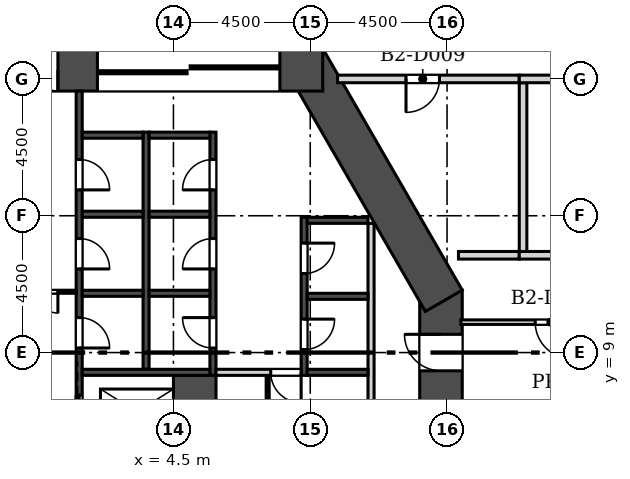
"""IFC4 building model, lengths in metres.
Left out: names, types, materials, properties, quantities, classifications, styles, units other than length and angle.
Written with IfcOpenShell. Run it as: python <this file> out.ifc"""

import sys

from ifc_helpers import new_model, si_unit, direction, frame, frame_2d, origin, place, context, subcontext, project, spatial, rectangle, extrude, element, fill, save


model = new_model("IFC4")
c1 = context("Model", 3, precision=1e-05, world=origin(), true_north=direction((0.0, 1.0)))
c2 = subcontext(c1, "Body", "Model", "MODEL_VIEW")
j1 = project(units=[si_unit("LENGTHUNIT", "METRE"), si_unit("PLANEANGLEUNIT", "RADIAN")], contexts=[c1])
p1 = place(None, origin())
s1 = spatial("IfcSite", under=j1, at=p1, CompositionType="ELEMENT")
p2 = place(p1, origin())
s2 = spatial("IfcBuilding", under=s1, at=p2, CompositionType="ELEMENT")
p3 = place(p2, frame((0.0, 0.0, -14.0)))
s3 = spatial("IfcBuildingStorey", under=s2, at=p3, CompositionType="ELEMENT", Elevation=-14.0)
p4 = place(p3, frame((42.971, 8.51, -0.4), z_axis=(0.0, 0.0, 1.0), x_axis=(-0.499999312333, 0.866025800809, 0.0)))
e1 = element("IfcWall", 1, at=p4, inside=s3, PredefinedType="SOLIDWALL", context=c2, shape_type="SweptSolid", body=[
    extrude(rectangle(XDim=76.231, YDim=0.6, at=frame_2d((38.115, 0.0))), origin(), (0.0, 0.0, 1.0), 6.4),
])
p5 = place(p3, frame((13.3, 0.85, 0.0), z_axis=(0.0, 0.0, 1.0), x_axis=(0.0, 1.0, 0.0)))
e2 = element("IfcWall", 2, at=p5, inside=s3, PredefinedType="SHEAR", context=c2, shape_type="SweptSolid", body=[
    extrude(rectangle(XDim=10.202, YDim=1.4, at=frame_2d((5.101, 0.0))), origin(), (0.0, 0.0, 1.0), 6.0),
])
p6 = place(p5, frame((3.55, 0.0, 0.0)))
e3 = element("IfcOpeningElement", 3, at=p6, cuts=e2, PredefinedType="OPENING", context=c2, shape_type="SweptSolid", body=[
    extrude(rectangle(XDim=1.2, YDim=2.1, at=frame_2d((0.6, 1.05))), frame((0.0, 0.71, 0.0), z_axis=(0.0, -1.0, 0.0), x_axis=(1.0, 0.0, 0.0)), (0.0, 0.0, 1.0), 1.42),
])
p7 = place(p5, frame((7.55, 0.0, 0.0)))
e4 = element("IfcOpeningElement", 4, at=p7, cuts=e2, PredefinedType="OPENING", context=c2, shape_type="SweptSolid", body=[
    extrude(rectangle(XDim=1.2, YDim=2.1, at=frame_2d((0.6, 1.05))), frame((0.0, 0.71, 0.0), z_axis=(0.0, -1.0, 0.0), x_axis=(1.0, 0.0, 0.0)), (0.0, 0.0, 1.0), 1.42),
])
p8 = place(p3, frame((13.394, 10.703, 0.0), z_axis=(0.0, 0.0, 1.0), x_axis=(-0.50000187635, 0.866024320471, 0.0)))
e5 = element("IfcWall", 5, at=p8, inside=s3, PredefinedType="SHEAR", context=c2, shape_type="SweptSolid", body=[
    extrude(rectangle(XDim=9.177, YDim=1.4, at=frame_2d((4.588, 0.0))), origin(), (0.0, 0.0, 1.0), 6.0),
])
p9 = place(p3, frame((9.412, 18.3, 0.0), z_axis=(0.0, 0.0, 1.0), x_axis=(-1.0, 0.0, 0.0)))
e6 = element("IfcWall", 6, at=p9, inside=s3, PredefinedType="SHEAR", context=c2, shape_type="SweptSolid", body=[
    extrude(rectangle(XDim=18.823, YDim=1.4, at=frame_2d((9.412, 0.0))), origin(), (0.0, 0.0, 1.0), 6.0),
])
p10 = place(p9, frame((8.711, 0.0, 0.0)))
e7 = element("IfcOpeningElement", 7, at=p10, cuts=e6, PredefinedType="OPENING", context=c2, shape_type="SweptSolid", body=[
    extrude(rectangle(XDim=1.4, YDim=2.1, at=frame_2d((0.7, 1.05))), frame((0.0, 0.71, 0.0), z_axis=(0.0, -1.0, 0.0), x_axis=(1.0, 0.0, 0.0)), (0.0, 0.0, 1.0), 1.42),
])
p11 = place(p9, frame((11.412, 0.0, 0.0)))
e8 = element("IfcOpeningElement", 8, at=p11, cuts=e6, PredefinedType="OPENING", context=c2, shape_type="SweptSolid", body=[
    extrude(rectangle(XDim=6.0, YDim=2.4, at=frame_2d((3.0, 1.2))), frame((0.0, 0.71, 0.0), z_axis=(0.0, -1.0, 0.0), x_axis=(1.0, 0.0, 0.0)), (0.0, 0.0, 1.0), 1.42),
])
p12 = place(p9, frame((1.412, 0.0, 0.0)))
e9 = element("IfcOpeningElement", 9, at=p12, cuts=e6, PredefinedType="OPENING", context=c2, shape_type="SweptSolid", body=[
    extrude(rectangle(XDim=6.0, YDim=2.4, at=frame_2d((3.0, 1.2))), frame((0.0, 0.71, 0.0), z_axis=(0.0, -1.0, 0.0), x_axis=(1.0, 0.0, 0.0)), (0.0, 0.0, 1.0), 1.42),
])
p13 = place(p3, frame((11.0, 5.85, 0.0), z_axis=(0.0, 0.0, 1.0), x_axis=(0.0, 1.0, 0.0)))
e10 = element("IfcWall", 10, at=p13, inside=s3, PredefinedType="SOLIDWALL", context=c2, shape_type="SweptSolid", body=[
    extrude(rectangle(XDim=7.4, YDim=0.2, at=frame_2d((3.7, 0.0))), origin(), (0.0, 0.0, 1.0), 5.65),
])
p14 = place(p3, frame((8.8, 8.25, 0.0), z_axis=(0.0, 0.0, 1.0), x_axis=(0.0, 1.0, 0.0)))
e11 = element("IfcWall", 11, at=p14, inside=s3, PredefinedType="SOLIDWALL", context=c2, shape_type="SweptSolid", body=[
    extrude(rectangle(XDim=5.2, YDim=0.2, at=frame_2d((2.6, 0.0))), origin(), (0.0, 0.0, 1.0), 5.65),
])
p15 = place(p14, frame((0.85, 0.0, 0.0)))
e12 = element("IfcOpeningElement", 12, at=p15, cuts=e11, PredefinedType="OPENING", context=c2, shape_type="SweptSolid", body=[
    extrude(rectangle(XDim=1.0, YDim=2.1, at=frame_2d((0.5, 1.05))), frame((0.0, 0.11, 0.0), z_axis=(0.0, -1.0, 0.0), x_axis=(1.0, 0.0, 0.0)), (0.0, 0.0, 1.0), 0.22),
])
p16 = place(p14, frame((3.35, 0.0, 0.0)))
e13 = element("IfcOpeningElement", 13, at=p16, cuts=e11, PredefinedType="OPENING", context=c2, shape_type="SweptSolid", body=[
    extrude(rectangle(XDim=1.0, YDim=2.1, at=frame_2d((0.5, 1.05))), frame((0.0, 0.11, 0.0), z_axis=(0.0, -1.0, 0.0), x_axis=(1.0, 0.0, 0.0)), (0.0, 0.0, 1.0), 0.22),
])
p17 = place(p3, frame((5.8, 8.25, 0.0), z_axis=(0.0, 0.0, 1.0), x_axis=(0.0, 1.0, 0.0)))
e14 = element("IfcWall", 14, at=p17, inside=s3, PredefinedType="SOLIDWALL", context=c2, shape_type="SweptSolid", body=[
    extrude(rectangle(XDim=8.0, YDim=0.2, at=frame_2d((4.0, 0.0))), origin(), (0.0, 0.0, 1.0), 5.65),
])
p18 = place(p17, frame((0.9, 0.0, 0.0)))
e15 = element("IfcOpeningElement", 15, at=p18, cuts=e14, PredefinedType="OPENING", context=c2, shape_type="SweptSolid", body=[
    extrude(rectangle(XDim=1.0, YDim=2.1, at=frame_2d((0.5, 1.05))), frame((0.0, 0.11, 0.0), z_axis=(0.0, -1.0, 0.0), x_axis=(1.0, 0.0, 0.0)), (0.0, 0.0, 1.0), 0.22),
])
p19 = place(p17, frame((3.5, 0.0, 0.0)))
e16 = element("IfcOpeningElement", 16, at=p19, cuts=e14, PredefinedType="OPENING", context=c2, shape_type="SweptSolid", body=[
    extrude(rectangle(XDim=1.0, YDim=2.1, at=frame_2d((0.5, 1.05))), frame((0.0, 0.11, 0.0), z_axis=(0.0, -1.0, 0.0), x_axis=(1.0, 0.0, 0.0)), (0.0, 0.0, 1.0), 0.22),
])
p20 = place(p17, frame((6.1, 0.0, 0.0)))
e17 = element("IfcOpeningElement", 17, at=p20, cuts=e14, PredefinedType="OPENING", context=c2, shape_type="SweptSolid", body=[
    extrude(rectangle(XDim=1.0, YDim=2.1, at=frame_2d((0.5, 1.05))), frame((0.0, 0.11, 0.0), z_axis=(0.0, -1.0, 0.0), x_axis=(1.0, 0.0, 0.0)), (0.0, 0.0, 1.0), 0.22),
])
p21 = place(p3, frame((3.6, 8.45, 0.0), z_axis=(0.0, 0.0, 1.0), x_axis=(0.0, 1.0, 0.0)))
e18 = element("IfcWall", 18, at=p21, inside=s3, PredefinedType="SOLIDWALL", context=c2, shape_type="SweptSolid", body=[
    extrude(rectangle(XDim=7.8, YDim=0.2, at=frame_2d((3.9, 0.0))), origin(), (0.0, 0.0, 1.0), 5.65),
])
p22 = place(p3, frame((1.4, 5.85, 0.0), z_axis=(0.0, 0.0, 1.0), x_axis=(0.0, 1.0, 0.0)))
e19 = element("IfcWall", 19, at=p22, inside=s3, PredefinedType="SOLIDWALL", context=c2, shape_type="SweptSolid", body=[
    extrude(rectangle(XDim=11.75, YDim=0.2, at=frame_2d((5.875, 0.0))), origin(), (0.0, 0.0, 1.0), 5.65),
])
p23 = place(p22, frame((0.65, 0.0, 0.0)))
e20 = element("IfcOpeningElement", 20, at=p23, cuts=e19, PredefinedType="OPENING", context=c2, shape_type="SweptSolid", body=[
    extrude(rectangle(XDim=1.1, YDim=2.1, at=frame_2d((0.55, 1.05))), frame((0.0, 0.11, 0.0), z_axis=(0.0, -1.0, 0.0), x_axis=(1.0, 0.0, 0.0)), (0.0, 0.0, 1.0), 0.22),
])
p24 = place(p22, frame((3.3, 0.0, 0.0)))
e21 = element("IfcOpeningElement", 21, at=p24, cuts=e19, PredefinedType="OPENING", context=c2, shape_type="SweptSolid", body=[
    extrude(rectangle(XDim=1.0, YDim=2.1, at=frame_2d((0.5, 1.05))), frame((0.0, 0.11, 0.0), z_axis=(0.0, -1.0, 0.0), x_axis=(1.0, 0.0, 0.0)), (0.0, 0.0, 1.0), 0.22),
])
p25 = place(p22, frame((5.9, 0.0, 0.0)))
e22 = element("IfcOpeningElement", 22, at=p25, cuts=e19, PredefinedType="OPENING", context=c2, shape_type="SweptSolid", body=[
    extrude(rectangle(XDim=1.0, YDim=2.1, at=frame_2d((0.5, 1.05))), frame((0.0, 0.11, 0.0), z_axis=(0.0, -1.0, 0.0), x_axis=(1.0, 0.0, 0.0)), (0.0, 0.0, 1.0), 0.22),
])
p26 = place(p22, frame((8.5, 0.0, 0.0)))
e23 = element("IfcOpeningElement", 23, at=p26, cuts=e19, PredefinedType="OPENING", context=c2, shape_type="SweptSolid", body=[
    extrude(rectangle(XDim=1.0, YDim=2.1, at=frame_2d((0.5, 1.05))), frame((0.0, 0.11, 0.0), z_axis=(0.0, -1.0, 0.0), x_axis=(1.0, 0.0, 0.0)), (0.0, 0.0, 1.0), 0.22),
])
p27 = place(p3, frame((5.2, 5.85, 0.0), z_axis=(0.0, 0.0, 1.0), x_axis=(0.0, 1.0, 0.0)))
e24 = element("IfcWall", 24, at=p27, inside=s3, PredefinedType="SOLIDWALL", context=c2, shape_type="SweptSolid", body=[
    extrude(rectangle(XDim=2.4, YDim=1.4, at=frame_2d((1.2, 0.0))), origin(), (0.0, 0.0, 1.0), 5.65),
])
p28 = place(p3, frame((8.9, 8.35, 0.0), z_axis=(0.0, 0.0, 1.0), x_axis=(1.0, 0.0, 0.0)))
e25 = element("IfcWall", 25, at=p28, inside=s3, PredefinedType="SOLIDWALL", context=c2, shape_type="SweptSolid", body=[
    extrude(rectangle(XDim=2.0, YDim=0.2, at=frame_2d((1.0, 0.0))), origin(), (0.0, 0.0, 1.0), 5.65),
])
p29 = place(p3, frame((1.5, 8.35, 0.0), z_axis=(0.0, 0.0, 1.0), x_axis=(1.0, 0.0, 0.0)))
e26 = element("IfcWall", 26, at=p29, inside=s3, PredefinedType="SOLIDWALL", context=c2, shape_type="SweptSolid", body=[
    extrude(rectangle(XDim=4.2, YDim=0.2, at=frame_2d((2.1, 0.0))), origin(), (0.0, 0.0, 1.0), 5.65),
])
for number, where, z_axis, x_axis in (
    (27, (8.9, 10.85, 0.0), (0.0, 0.0, 1.0), (1.0, 0.0, 0.0)),
    (28, (8.9, 13.35, 0.0), (0.0, 0.0, 1.0), (1.0, 0.0, 0.0)),
    (29, (3.7, 10.95, 0.0), (0.0, 0.0, 1.0), (1.0, 0.0, 0.0)),
    (30, (3.7, 13.55, 0.0), (0.0, 0.0, 1.0), (1.0, 0.0, 0.0)),
    (31, (3.7, 16.15, 0.0), (0.0, 0.0, 1.0), (1.0, 0.0, 0.0)),
    (32, (1.5, 10.95, 0.0), (0.0, 0.0, 1.0), (1.0, 0.0, 0.0)),
    (33, (1.5, 13.55, 0.0), (0.0, 0.0, 1.0), (1.0, 0.0, 0.0)),
    (34, (1.5, 16.15, 0.0), (0.0, 0.0, 1.0), (1.0, 0.0, 0.0)),
):
    element("IfcWall", number, at=place(p3, frame(where, z_axis=z_axis, x_axis=x_axis)), inside=s3, PredefinedType="SOLIDWALL", context=c2, shape_type="SweptSolid", body=[
        extrude(rectangle(XDim=2.0, YDim=0.2, at=frame_2d((1.0, 0.0))), origin(), (0.0, 0.0, 1.0), 5.65),
    ])
p30 = place(p3, frame((7.6, 5.85, 0.0), z_axis=(0.0, 0.0, 1.0), x_axis=(0.0, 1.0, 0.0)))
e35 = element("IfcWall", 35, at=p30, inside=s3, PredefinedType="PARTITIONING", context=c2, shape_type="SweptSolid", body=[
    extrude(rectangle(XDim=2.4, YDim=0.1, at=frame_2d((1.2, 0.0))), origin(), (0.0, 0.0, 1.0), 5.65),
])
p31 = place(p30, frame((0.7, 0.0, 0.0)))
e36 = element("IfcOpeningElement", 36, at=p31, cuts=e35, PredefinedType="OPENING", context=c2, shape_type="SweptSolid", body=[
    extrude(rectangle(XDim=0.9, YDim=2.1, at=frame_2d((0.45, 1.05))), frame((0.0, 0.06, 0.0), z_axis=(0.0, -1.0, 0.0), x_axis=(1.0, 0.0, 0.0)), (0.0, 0.0, 1.0), 0.12),
])
p32 = place(p3, frame((5.9, 8.35, 0.0), z_axis=(0.0, 0.0, 1.0), x_axis=(1.0, 0.0, 0.0)))
e37 = element("IfcWall", 37, at=p32, inside=s3, PredefinedType="SOLIDWALL", context=c2, shape_type="SweptSolid", body=[
    extrude(rectangle(XDim=2.8, YDim=0.2, at=frame_2d((1.4, 0.0))), origin(), (0.0, 0.0, 1.0), 5.65),
])
p33 = place(p32, frame((1.8, 0.0, 0.0)))
e38 = element("IfcOpeningElement", 38, at=p33, cuts=e37, PredefinedType="OPENING", context=c2, shape_type="SweptSolid", body=[
    extrude(rectangle(XDim=1.0, YDim=2.1, at=frame_2d((0.5, 1.05))), frame((0.0, 0.11, 0.0), z_axis=(0.0, -1.0, 0.0), x_axis=(1.0, 0.0, 0.0)), (0.0, 0.0, 1.0), 0.22),
])
p34 = place(p3, frame((-1.3, 11.0, 0.0), z_axis=(0.0, 0.0, 1.0), x_axis=(1.0, 0.0, 0.0)))
e39 = element("IfcWall", 39, at=p34, inside=s3, PredefinedType="PARTITIONING", context=c2, shape_type="SweptSolid", body=[
    extrude(rectangle(XDim=2.6, YDim=0.1, at=frame_2d((1.3, 0.0))), origin(), (0.0, 0.0, 1.0), 5.65),
])
p35 = place(p34, frame((0.6, 0.0, 0.0)))
e40 = element("IfcOpeningElement", 40, at=p35, cuts=e39, PredefinedType="OPENING", context=c2, shape_type="SweptSolid", body=[
    extrude(rectangle(XDim=1.4, YDim=2.1, at=frame_2d((0.7, 1.05))), frame((0.0, 0.06, 0.0), z_axis=(0.0, -1.0, 0.0), x_axis=(1.0, 0.0, 0.0)), (0.0, 0.0, 1.0), 0.12),
])
p36 = place(p3, frame((13.955, 10.0, 0.0), z_axis=(0.0, 0.0, 1.0), x_axis=(1.0, 0.0, 0.0)))
e41 = element("IfcWall", 41, at=p36, inside=s3, PredefinedType="PARTITIONING", context=c2, shape_type="SweptSolid", body=[
    extrude(rectangle(XDim=5.92, YDim=0.15, at=frame_2d((2.96, 0.0))), origin(), (0.0, 0.0, 1.0), 5.65),
])
p37 = place(p36, frame((2.445, 0.0, 0.0)))
e42 = element("IfcOpeningElement", 42, at=p37, cuts=e41, PredefinedType="OPENING", context=c2, shape_type="SweptSolid", body=[
    extrude(rectangle(XDim=1.2, YDim=2.1, at=frame_2d((0.6, 1.05))), frame((0.0, 0.085, 0.0), z_axis=(0.0, -1.0, 0.0), x_axis=(1.0, 0.0, 0.0)), (0.0, 0.0, 1.0), 0.17),
])
p38 = place(p3, frame((13.875, 12.2, 0.0), z_axis=(0.0, 0.0, 1.0), x_axis=(1.0, 0.0, 0.0)))
e43 = element("IfcWall", 43, at=p38, inside=s3, PredefinedType="SOLIDWALL", context=c2, shape_type="SweptSolid", body=[
    extrude(rectangle(XDim=2.0, YDim=0.25, at=frame_2d((1.0, 0.0))), origin(), (0.0, 0.0, 1.0), 5.65),
])
p39 = place(p3, frame((15.875, 12.2, 0.0), z_axis=(0.0, 0.0, 1.0), x_axis=(1.0, 0.0, 0.0)))
e44 = element("IfcWall", 44, at=p39, inside=s3, PredefinedType="SOLIDWALL", context=c2, shape_type="SweptSolid", body=[
    extrude(rectangle(XDim=6.0, YDim=0.25, at=frame_2d((3.0, 0.0))), origin(), (0.0, 0.0, 1.0), 5.65),
])
p40 = place(p3, frame((16.0, 17.875, 0.0), z_axis=(0.0, 0.0, 1.0), x_axis=(0.0, -1.0, 0.0)))
e45 = element("IfcWall", 45, at=p40, inside=s3, PredefinedType="SOLIDWALL", context=c2, shape_type="SweptSolid", body=[
    extrude(rectangle(XDim=5.55, YDim=0.25, at=frame_2d((2.775, 0.0))), origin(), (0.0, 0.0, 1.0), 5.65),
])
p41 = place(p3, frame((15.875, 18.0, 0.0), z_axis=(0.0, 0.0, 1.0), x_axis=(-1.0, 0.0, 0.0)))
e46 = element("IfcWall", 46, at=p41, inside=s3, PredefinedType="SOLIDWALL", context=c2, shape_type="SweptSolid", body=[
    extrude(rectangle(XDim=5.977, YDim=0.25, at=frame_2d((2.988, 0.0))), origin(), (0.0, 0.0, 1.0), 5.65),
])
p42 = place(p41, frame((2.625, 0.0, 0.0)))
e47 = element("IfcOpeningElement", 47, at=p42, cuts=e46, PredefinedType="OPENING", context=c2, shape_type="SweptSolid", body=[
    extrude(rectangle(XDim=1.1, YDim=2.1, at=frame_2d((0.55, 1.05))), frame((0.0, 0.135, 0.0), z_axis=(0.0, -1.0, 0.0), x_axis=(1.0, 0.0, 0.0)), (0.0, 0.0, 1.0), 0.27),
])
p43 = place(p3, frame((21.875, 18.0, 0.0), z_axis=(0.0, 0.0, 1.0), x_axis=(-1.0, 0.0, 0.0)))
e48 = element("IfcWall", 48, at=p43, inside=s3, PredefinedType="SOLIDWALL", context=c2, shape_type="SweptSolid", body=[
    extrude(rectangle(XDim=6.0, YDim=0.25, at=frame_2d((3.0, 0.0))), origin(), (0.0, 0.0, 1.0), 5.65),
])
p44 = place(p43, frame((2.325, 0.0, 0.0)))
e49 = element("IfcOpeningElement", 49, at=p44, cuts=e48, PredefinedType="OPENING", context=c2, shape_type="SweptSolid", body=[
    extrude(rectangle(XDim=1.1, YDim=2.1, at=frame_2d((0.55, 1.05))), frame((0.0, 0.135, 0.0), z_axis=(0.0, -1.0, 0.0), x_axis=(1.0, 0.0, 0.0)), (0.0, 0.0, 1.0), 0.27),
])
p45 = place(p23, origin())
e50 = element("IfcDoor", 50, at=p45, inside=s3, OperationType="SLIDING_TO_RIGHT", PredefinedType="DOOR", context=c2, shape_type="SweptSolid", body=[
    extrude(rectangle(XDim=1.1, YDim=2.1, at=frame_2d((0.55, 1.05))), frame((0.0, 0.025, 0.0), z_axis=(0.0, -1.0, 0.0), x_axis=(1.0, 0.0, 0.0)), (0.0, 0.0, 1.0), 0.05),
])
fill(e20, e50)
p46 = place(p15, frame((1.0, 0.0, 0.0), z_axis=(0.0, 0.0, 1.0), x_axis=(-1.0, 0.0, 0.0)))
e51 = element("IfcDoor", 51, at=p46, inside=s3, OperationType="SINGLE_SWING_LEFT", PredefinedType="DOOR", context=c2, shape_type="SweptSolid", body=[
    extrude(rectangle(XDim=1.0, YDim=2.1, at=frame_2d((0.5, 1.05))), frame((0.0, 0.025, 0.0), z_axis=(0.0, -1.0, 0.0), x_axis=(1.0, 0.0, 0.0)), (0.0, 0.0, 1.0), 0.05),
])
fill(e12, e51)
p47 = place(p16, frame((1.0, 0.0, 0.0), z_axis=(0.0, 0.0, 1.0), x_axis=(-1.0, 0.0, 0.0)))
e52 = element("IfcDoor", 52, at=p47, inside=s3, OperationType="SINGLE_SWING_LEFT", PredefinedType="DOOR", context=c2, shape_type="SweptSolid", body=[
    extrude(rectangle(XDim=1.0, YDim=2.1, at=frame_2d((0.5, 1.05))), frame((0.0, 0.025, 0.0), z_axis=(0.0, -1.0, 0.0), x_axis=(1.0, 0.0, 0.0)), (0.0, 0.0, 1.0), 0.05),
])
fill(e13, e52)
p48 = place(p18, origin())
e53 = element("IfcDoor", 53, at=p48, inside=s3, OperationType="SINGLE_SWING_RIGHT", PredefinedType="DOOR", context=c2, shape_type="SweptSolid", body=[
    extrude(rectangle(XDim=1.0, YDim=2.1, at=frame_2d((0.5, 1.05))), frame((0.0, 0.025, 0.0), z_axis=(0.0, -1.0, 0.0), x_axis=(1.0, 0.0, 0.0)), (0.0, 0.0, 1.0), 0.05),
])
fill(e15, e53)
p49 = place(p19, origin())
e54 = element("IfcDoor", 54, at=p49, inside=s3, OperationType="SINGLE_SWING_LEFT", PredefinedType="DOOR", context=c2, shape_type="SweptSolid", body=[
    extrude(rectangle(XDim=1.0, YDim=2.1, at=frame_2d((0.5, 1.05))), frame((0.0, 0.025, 0.0), z_axis=(0.0, -1.0, 0.0), x_axis=(1.0, 0.0, 0.0)), (0.0, 0.0, 1.0), 0.05),
])
fill(e16, e54)
p50 = place(p20, origin())
e55 = element("IfcDoor", 55, at=p50, inside=s3, OperationType="SINGLE_SWING_LEFT", PredefinedType="DOOR", context=c2, shape_type="SweptSolid", body=[
    extrude(rectangle(XDim=1.0, YDim=2.1, at=frame_2d((0.5, 1.05))), frame((0.0, 0.025, 0.0), z_axis=(0.0, -1.0, 0.0), x_axis=(1.0, 0.0, 0.0)), (0.0, 0.0, 1.0), 0.05),
])
fill(e17, e55)
p51 = place(p24, frame((1.0, 0.0, 0.0), z_axis=(0.0, 0.0, 1.0), x_axis=(-1.0, 0.0, 0.0)))
e56 = element("IfcDoor", 56, at=p51, inside=s3, OperationType="SINGLE_SWING_RIGHT", PredefinedType="DOOR", context=c2, shape_type="SweptSolid", body=[
    extrude(rectangle(XDim=1.0, YDim=2.1, at=frame_2d((0.5, 1.05))), frame((0.0, 0.025, 0.0), z_axis=(0.0, -1.0, 0.0), x_axis=(1.0, 0.0, 0.0)), (0.0, 0.0, 1.0), 0.05),
])
fill(e21, e56)
p52 = place(p25, frame((1.0, 0.0, 0.0), z_axis=(0.0, 0.0, 1.0), x_axis=(-1.0, 0.0, 0.0)))
e57 = element("IfcDoor", 57, at=p52, inside=s3, OperationType="SINGLE_SWING_RIGHT", PredefinedType="DOOR", context=c2, shape_type="SweptSolid", body=[
    extrude(rectangle(XDim=1.0, YDim=2.1, at=frame_2d((0.5, 1.05))), frame((0.0, 0.025, 0.0), z_axis=(0.0, -1.0, 0.0), x_axis=(1.0, 0.0, 0.0)), (0.0, 0.0, 1.0), 0.05),
])
fill(e22, e57)
p53 = place(p26, frame((1.0, 0.0, 0.0), z_axis=(0.0, 0.0, 1.0), x_axis=(-1.0, 0.0, 0.0)))
e58 = element("IfcDoor", 58, at=p53, inside=s3, OperationType="SINGLE_SWING_RIGHT", PredefinedType="DOOR", context=c2, shape_type="SweptSolid", body=[
    extrude(rectangle(XDim=1.0, YDim=2.1, at=frame_2d((0.5, 1.05))), frame((0.0, 0.025, 0.0), z_axis=(0.0, -1.0, 0.0), x_axis=(1.0, 0.0, 0.0)), (0.0, 0.0, 1.0), 0.05),
])
fill(e23, e58)
p54 = place(p33, frame((1.0, 0.0, 0.0), z_axis=(0.0, 0.0, 1.0), x_axis=(-1.0, 0.0, 0.0)))
e59 = element("IfcDoor", 59, at=p54, inside=s3, OperationType="SINGLE_SWING_LEFT", PredefinedType="DOOR", context=c2, shape_type="SweptSolid", body=[
    extrude(rectangle(XDim=1.0, YDim=2.1, at=frame_2d((0.5, 1.05))), frame((0.0, 0.025, 0.0), z_axis=(0.0, -1.0, 0.0), x_axis=(1.0, 0.0, 0.0)), (0.0, 0.0, 1.0), 0.05),
])
fill(e38, e59)
p55 = place(p7, origin())
e60 = element("IfcDoor", 60, at=p55, inside=s3, OperationType="SINGLE_SWING_RIGHT", PredefinedType="DOOR", context=c2, shape_type="SweptSolid", body=[
    extrude(rectangle(XDim=1.2, YDim=2.1, at=frame_2d((0.6, 1.05))), frame((0.0, 0.025, 0.0), z_axis=(0.0, -1.0, 0.0), x_axis=(1.0, 0.0, 0.0)), (0.0, 0.0, 1.0), 0.05),
])
fill(e4, e60)
p56 = place(p35, frame((1.4, 0.0, 0.0), z_axis=(0.0, 0.0, 1.0), x_axis=(-1.0, 0.0, 0.0)))
e61 = element("IfcDoor", 61, at=p56, inside=s3, OperationType="DOUBLE_DOOR_SINGLE_SWING", PredefinedType="DOOR", context=c2, shape_type="SweptSolid", body=[
    extrude(rectangle(XDim=1.4, YDim=2.1, at=frame_2d((0.7, 1.05))), frame((0.0, 0.025, 0.0), z_axis=(0.0, -1.0, 0.0), x_axis=(1.0, 0.0, 0.0)), (0.0, 0.0, 1.0), 0.05),
])
fill(e40, e61)
p57 = place(p10, origin())
e62 = element("IfcDoor", 62, at=p57, inside=s3, OperationType="DOUBLE_DOOR_SINGLE_SWING", PredefinedType="DOOR", context=c2, shape_type="SweptSolid", body=[
    extrude(rectangle(XDim=1.4, YDim=2.1, at=frame_2d((0.7, 1.05))), frame((0.0, 0.025, 0.0), z_axis=(0.0, -1.0, 0.0), x_axis=(1.0, 0.0, 0.0)), (0.0, 0.0, 1.0), 0.05),
])
fill(e7, e62)
p58 = place(p12, origin())
e63 = element("IfcDoor", 63, at=p58, inside=s3, OperationType="DOUBLE_DOOR_SLIDING", PredefinedType="DOOR", context=c2, shape_type="SweptSolid", body=[
    extrude(rectangle(XDim=6.0, YDim=2.4, at=frame_2d((3.0, 1.2))), frame((0.0, 0.025, 0.0), z_axis=(0.0, -1.0, 0.0), x_axis=(1.0, 0.0, 0.0)), (0.0, 0.0, 1.0), 0.05),
])
fill(e9, e63)
p59 = place(p37, frame((1.2, 0.0, 0.0), z_axis=(0.0, 0.0, 1.0), x_axis=(-1.0, 0.0, 0.0)))
e64 = element("IfcDoor", 64, at=p59, inside=s3, OperationType="SINGLE_SWING_LEFT", PredefinedType="DOOR", context=c2, shape_type="SweptSolid", body=[
    extrude(rectangle(XDim=1.2, YDim=2.1, at=frame_2d((0.6, 1.05))), frame((0.0, 0.025, 0.0), z_axis=(0.0, -1.0, 0.0), x_axis=(1.0, 0.0, 0.0)), (0.0, 0.0, 1.0), 0.05),
])
fill(e42, e64)
p60 = place(p42, origin())
e65 = element("IfcDoor", 65, at=p60, inside=s3, OperationType="SINGLE_SWING_RIGHT", PredefinedType="DOOR", context=c2, shape_type="SweptSolid", body=[
    extrude(rectangle(XDim=1.1, YDim=2.1, at=frame_2d((0.55, 1.05))), frame((0.0, 0.025, 0.0), z_axis=(0.0, -1.0, 0.0), x_axis=(1.0, 0.0, 0.0)), (0.0, 0.0, 1.0), 0.05),
])
fill(e47, e65)
save(model, sys.argv[1])
